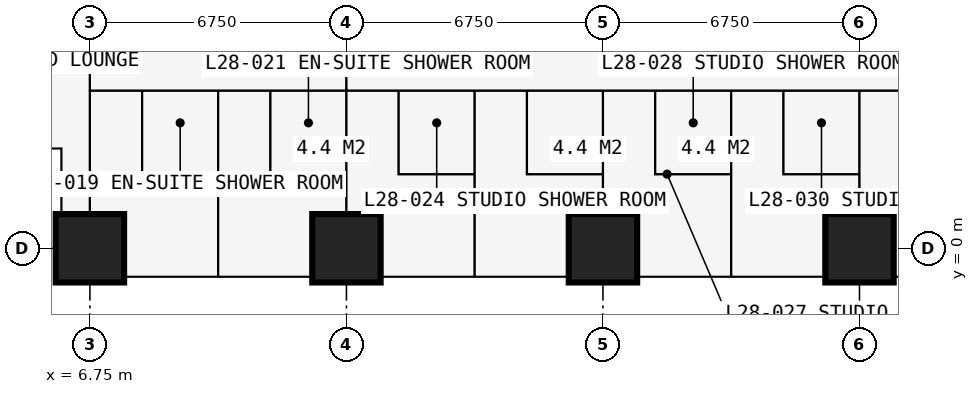
"""IFC4 building model, lengths in metres.
Left out: names, types, materials, properties, quantities, classifications, styles, units other than length and angle.
Written with IfcOpenShell. Run it as: python <this file> out.ifc"""

import sys

from ifc_helpers import new_model, si_unit, direction, frame, frame_2d, origin, origin_2d, place, context, subcontext, project, spatial, rectangle, extrude, element, fill, save


model = new_model("IFC4")
c1 = context("Model", 3, precision=1e-05, world=origin(), true_north=direction((0.0, 1.0)))
c2 = subcontext(c1, "Body", "Model", "MODEL_VIEW")
j1 = project(units=[si_unit("LENGTHUNIT", "METRE"), si_unit("PLANEANGLEUNIT", "RADIAN")], contexts=[c1])
p1 = place(None, origin())
s1 = spatial("IfcSite", under=j1, at=p1, CompositionType="ELEMENT")
p2 = place(p1, origin())
s2 = spatial("IfcBuilding", under=s1, at=p2, CompositionType="ELEMENT")
p3 = place(p2, frame((0.0, 0.0, 105.3)))
s3 = spatial("IfcBuildingStorey", under=s2, at=p3, CompositionType="ELEMENT", Elevation=105.3)
for number, where, z_axis, x_axis in (
    (1, (6.75, 0.0, 0.0), (0.0, 0.0, 1.0), (1.0, 0.0, 0.0)),
    (2, (13.5, 0.0, 0.0), (0.0, 0.0, 1.0), (1.0, 0.0, 0.0)),
    (3, (20.25, 0.0, 0.0), (0.0, 0.0, 1.0), (1.0, 0.0, 0.0)),
    (4, (27.0, 0.0, 0.0), (0.0, 0.0, 1.0), (1.0, 0.0, 0.0)),
):
    element("IfcColumn", number, at=place(p3, frame(where, z_axis=z_axis, x_axis=x_axis)), inside=s3, PredefinedType="COLUMN", context=c2, shape_type="SweptSolid", body=[
        extrude(rectangle(XDim=1.8, YDim=1.8, at=origin_2d()), origin(), (0.0, 0.0, 1.0), 3.6),
    ])
p4 = place(p3, frame((2.625, 2.625, 0.0), z_axis=(0.0, 0.0, 1.0), x_axis=(1.0, 0.0, 0.0)))
e5 = element("IfcWall", 5, at=p4, inside=s3, PredefinedType="SOLIDWALL", context=c2, shape_type="SweptSolid", body=[
    extrude(rectangle(XDim=3.375, YDim=0.3, at=frame_2d((1.688, 0.0))), origin(), (0.0, 0.0, 1.0), 3.375),
])
p5 = place(p4, frame((0.788, 0.0, 0.6)))
e6 = element("IfcOpeningElement", 6, at=p5, cuts=e5, PredefinedType="OPENING", context=c2, shape_type="SweptSolid", body=[
    extrude(rectangle(XDim=1.8, YDim=2.1, at=frame_2d((0.9, 1.05))), frame((0.0, 0.16, 0.0), z_axis=(0.0, -1.0, 0.0), x_axis=(1.0, 0.0, 0.0)), (0.0, 0.0, 1.0), 0.32),
])
p6 = place(p3, frame((6.0, 2.625, 0.0), z_axis=(0.0, 0.0, 1.0), x_axis=(0.0, -1.0, 0.0)))
e7 = element("IfcWall", 7, at=p6, inside=s3, PredefinedType="SOLIDWALL", context=c2, shape_type="SweptSolid", body=[
    extrude(rectangle(XDim=3.375, YDim=0.3, at=frame_2d((1.688, 0.0))), origin(), (0.0, 0.0, 1.0), 3.375),
])
p7 = place(p6, frame((0.343, 0.0, 0.9)))
e8 = element("IfcOpeningElement", 8, at=p7, cuts=e7, PredefinedType="OPENING", context=c2, shape_type="SweptSolid", body=[
    extrude(rectangle(XDim=1.2, YDim=1.8, at=frame_2d((0.6, 0.9))), frame((0.0, 0.16, 0.0), z_axis=(0.0, -1.0, 0.0), x_axis=(1.0, 0.0, 0.0)), (0.0, 0.0, 1.0), 0.32),
])
p8 = place(p3, frame((27.0, -0.75, 0.0), z_axis=(0.0, 0.0, 1.0), x_axis=(-1.0, 0.0, 0.0)))
e9 = element("IfcWall", 9, at=p8, inside=s3, PredefinedType="SOLIDWALL", context=c2, shape_type="SweptSolid", body=[
    extrude(rectangle(XDim=6.75, YDim=0.15, at=frame_2d((3.375, 0.0))), origin(), (0.0, 0.0, 1.0), 3.375),
])
p9 = place(p8, frame((0.962, 0.0, 0.0)))
e10 = element("IfcOpeningElement", 10, at=p9, cuts=e9, PredefinedType="OPENING", context=c2, shape_type="SweptSolid", body=[
    extrude(rectangle(XDim=1.0, YDim=2.2, at=frame_2d((0.5, 1.1))), frame((0.0, 0.085, 0.0), z_axis=(0.0, -1.0, 0.0), x_axis=(1.0, 0.0, 0.0)), (0.0, 0.0, 1.0), 0.17),
])
p10 = place(p8, frame((2.025, 0.0, 0.9)))
e11 = element("IfcOpeningElement", 11, at=p10, cuts=e9, PredefinedType="OPENING", context=c2, shape_type="SweptSolid", body=[
    extrude(rectangle(XDim=1.2, YDim=1.8, at=frame_2d((0.6, 0.9))), frame((0.0, 0.085, 0.0), z_axis=(0.0, -1.0, 0.0), x_axis=(1.0, 0.0, 0.0)), (0.0, 0.0, 1.0), 0.17),
])
p11 = place(p8, frame((4.788, 0.0, 0.0)))
e12 = element("IfcOpeningElement", 12, at=p11, cuts=e9, PredefinedType="OPENING", context=c2, shape_type="SweptSolid", body=[
    extrude(rectangle(XDim=1.0, YDim=2.2, at=frame_2d((0.5, 1.1))), frame((0.0, 0.085, 0.0), z_axis=(0.0, -1.0, 0.0), x_axis=(1.0, 0.0, 0.0)), (0.0, 0.0, 1.0), 0.17),
])
p12 = place(p8, frame((3.525, 0.0, 0.9)))
e13 = element("IfcOpeningElement", 13, at=p12, cuts=e9, PredefinedType="OPENING", context=c2, shape_type="SweptSolid", body=[
    extrude(rectangle(XDim=1.2, YDim=1.8, at=frame_2d((0.6, 0.9))), frame((0.0, 0.085, 0.0), z_axis=(0.0, -1.0, 0.0), x_axis=(1.0, 0.0, 0.0)), (0.0, 0.0, 1.0), 0.17),
])
p13 = place(p3, frame((23.625, -0.85, 0.0), z_axis=(0.0, 0.0, 1.0), x_axis=(0.0, -1.0, 0.0)))
e14 = element("IfcWall", 14, at=p13, inside=s3, PredefinedType="USERDEFINED", context=c2, shape_type="SweptSolid", body=[
    extrude(rectangle(XDim=2.2, YDim=1.0, at=frame_2d((1.1, 0.0))), origin(), (0.0, 0.0, 1.0), 0.9),
])
p14 = place(p3, frame((6.75, -0.734, 0.0), z_axis=(0.0, 0.0, 1.0), x_axis=(0.0, 1.0, 0.0)))
e15 = element("IfcWall", 15, at=p14, inside=s3, PredefinedType="PARTITIONING", context=c2, shape_type="SweptSolid", body=[
    extrude(rectangle(XDim=10.859, YDim=0.15, at=frame_2d((5.429, 0.0))), origin(), (0.0, 0.0, 1.0), 2.877),
])
p15 = place(p3, frame((6.75, 4.15, 0.0), z_axis=(0.0, 0.0, 1.0), x_axis=(1.0, 0.0, 0.0)))
e16 = element("IfcWall", 16, at=p15, inside=s3, PredefinedType="PARTITIONING", context=c2, shape_type="SweptSolid", body=[
    extrude(rectangle(XDim=23.625, YDim=0.1, at=frame_2d((11.812, 0.0))), origin(), (0.0, 0.0, 1.0), 3.375),
])
p16 = place(p15, frame((0.2, 0.0, 0.0)))
e17 = element("IfcOpeningElement", 17, at=p16, cuts=e16, PredefinedType="OPENING", context=c2, shape_type="SweptSolid", body=[
    extrude(rectangle(XDim=0.95, YDim=2.2, at=frame_2d((0.475, 1.1))), frame((0.0, 0.06, 0.0), z_axis=(0.0, -1.0, 0.0), x_axis=(1.0, 0.0, 0.0)), (0.0, 0.0, 1.0), 0.12),
])
p17 = place(p15, frame((3.625, 0.0, 0.0)))
e18 = element("IfcOpeningElement", 18, at=p17, cuts=e16, PredefinedType="OPENING", context=c2, shape_type="SweptSolid", body=[
    extrude(rectangle(XDim=0.95, YDim=2.2, at=frame_2d((0.475, 1.1))), frame((0.0, 0.06, 0.0), z_axis=(0.0, -1.0, 0.0), x_axis=(1.0, 0.0, 0.0)), (0.0, 0.0, 1.0), 0.12),
])
p18 = place(p15, frame((6.95, 0.0, 0.0)))
e19 = element("IfcOpeningElement", 19, at=p18, cuts=e16, PredefinedType="OPENING", context=c2, shape_type="SweptSolid", body=[
    extrude(rectangle(XDim=0.95, YDim=2.2, at=frame_2d((0.475, 1.1))), frame((0.0, 0.06, 0.0), z_axis=(0.0, -1.0, 0.0), x_axis=(1.0, 0.0, 0.0)), (0.0, 0.0, 1.0), 0.12),
])
p19 = place(p15, frame((10.375, 0.0, 0.0)))
e20 = element("IfcOpeningElement", 20, at=p19, cuts=e16, PredefinedType="OPENING", context=c2, shape_type="SweptSolid", body=[
    extrude(rectangle(XDim=0.95, YDim=2.2, at=frame_2d((0.475, 1.1))), frame((0.0, 0.06, 0.0), z_axis=(0.0, -1.0, 0.0), x_axis=(1.0, 0.0, 0.0)), (0.0, 0.0, 1.0), 0.12),
])
p20 = place(p15, frame((13.75, 0.0, 0.0)))
e21 = element("IfcOpeningElement", 21, at=p20, cuts=e16, PredefinedType="OPENING", context=c2, shape_type="SweptSolid", body=[
    extrude(rectangle(XDim=0.95, YDim=2.2, at=frame_2d((0.475, 1.1))), frame((0.0, 0.06, 0.0), z_axis=(0.0, -1.0, 0.0), x_axis=(1.0, 0.0, 0.0)), (0.0, 0.0, 1.0), 0.12),
])
p21 = place(p15, frame((17.125, 0.0, 0.0)))
e22 = element("IfcOpeningElement", 22, at=p21, cuts=e16, PredefinedType="OPENING", context=c2, shape_type="SweptSolid", body=[
    extrude(rectangle(XDim=0.95, YDim=2.2, at=frame_2d((0.475, 1.1))), frame((0.0, 0.06, 0.0), z_axis=(0.0, -1.0, 0.0), x_axis=(1.0, 0.0, 0.0)), (0.0, 0.0, 1.0), 0.12),
])
p22 = place(p15, frame((20.5, 0.0, 0.0)))
e23 = element("IfcOpeningElement", 23, at=p22, cuts=e16, PredefinedType="OPENING", context=c2, shape_type="SweptSolid", body=[
    extrude(rectangle(XDim=0.95, YDim=2.2, at=frame_2d((0.475, 1.1))), frame((0.0, 0.06, 0.0), z_axis=(0.0, -1.0, 0.0), x_axis=(1.0, 0.0, 0.0)), (0.0, 0.0, 1.0), 0.12),
])
p23 = place(p3, frame((8.125, 1.95, 0.0), z_axis=(0.0, 0.0, 1.0), x_axis=(0.0, 1.0, 0.0)))
e24 = element("IfcWall", 24, at=p23, inside=s3, PredefinedType="PARTITIONING", context=c2, shape_type="SweptSolid", body=[
    extrude(rectangle(XDim=2.2, YDim=0.1, at=frame_2d((1.1, 0.0))), origin(), (0.0, 0.0, 1.0), 3.375),
])
p24 = place(p23, frame((0.65, 0.0, 0.0)))
e25 = element("IfcOpeningElement", 25, at=p24, cuts=e24, PredefinedType="OPENING", context=c2, shape_type="SweptSolid", body=[
    extrude(rectangle(XDim=0.9, YDim=2.2, at=frame_2d((0.45, 1.1))), frame((0.0, 0.06, 0.0), z_axis=(0.0, -1.0, 0.0), x_axis=(1.0, 0.0, 0.0)), (0.0, 0.0, 1.0), 0.12),
])
p25 = place(p3, frame((8.125, 1.95, 0.0), z_axis=(0.0, 0.0, 1.0), x_axis=(1.0, 0.0, 0.0)))
e26 = element("IfcWall", 26, at=p25, inside=s3, PredefinedType="PARTITIONING", context=c2, shape_type="SweptSolid", body=[
    extrude(rectangle(XDim=2.0, YDim=0.1, at=frame_2d((1.0, 0.0))), origin(), (0.0, 0.0, 1.0), 3.375),
])
p26 = place(p3, frame((10.125, -0.734, 0.0), z_axis=(0.0, 0.0, 1.0), x_axis=(0.0, 1.0, 0.0)))
e27 = element("IfcWall", 27, at=p26, inside=s3, PredefinedType="PARTITIONING", context=c2, shape_type="SweptSolid", body=[
    extrude(rectangle(XDim=4.884, YDim=0.175, at=frame_2d((2.442, 0.0))), origin(), (0.0, 0.0, 1.0), 3.375),
])
p27 = place(p3, frame((11.5, 1.95, 0.0), z_axis=(0.0, 0.0, 1.0), x_axis=(0.0, 1.0, 0.0)))
e28 = element("IfcWall", 28, at=p27, inside=s3, PredefinedType="PARTITIONING", context=c2, shape_type="SweptSolid", body=[
    extrude(rectangle(XDim=2.2, YDim=0.1, at=frame_2d((1.1, 0.0))), origin(), (0.0, 0.0, 1.0), 3.375),
])
p28 = place(p27, frame((0.65, 0.0, 0.0)))
e29 = element("IfcOpeningElement", 29, at=p28, cuts=e28, PredefinedType="OPENING", context=c2, shape_type="SweptSolid", body=[
    extrude(rectangle(XDim=0.9, YDim=2.2, at=frame_2d((0.45, 1.1))), frame((0.0, 0.06, 0.0), z_axis=(0.0, -1.0, 0.0), x_axis=(1.0, 0.0, 0.0)), (0.0, 0.0, 1.0), 0.12),
])
p29 = place(p3, frame((11.5, 1.95, 0.0), z_axis=(0.0, 0.0, 1.0), x_axis=(1.0, 0.0, 0.0)))
e30 = element("IfcWall", 30, at=p29, inside=s3, PredefinedType="PARTITIONING", context=c2, shape_type="SweptSolid", body=[
    extrude(rectangle(XDim=2.0, YDim=0.1, at=frame_2d((1.0, 0.0))), origin(), (0.0, 0.0, 1.0), 3.375),
])
p30 = place(p3, frame((13.5, -0.734, 0.0), z_axis=(0.0, 0.0, 1.0), x_axis=(0.0, 1.0, 0.0)))
e31 = element("IfcWall", 31, at=p30, inside=s3, PredefinedType="PARTITIONING", context=c2, shape_type="SweptSolid", body=[
    extrude(rectangle(XDim=12.034, YDim=0.15, at=frame_2d((6.017, 0.0))), origin(), (0.0, 0.0, 1.0), 2.61),
])
p31 = place(p3, frame((14.875, 1.95, 0.0), z_axis=(0.0, 0.0, 1.0), x_axis=(0.0, 1.0, 0.0)))
e32 = element("IfcWall", 32, at=p31, inside=s3, PredefinedType="PARTITIONING", context=c2, shape_type="SweptSolid", body=[
    extrude(rectangle(XDim=2.2, YDim=0.1, at=frame_2d((1.1, 0.0))), origin(), (0.0, 0.0, 1.0), 3.375),
])
p32 = place(p31, frame((0.65, 0.0, 0.0)))
e33 = element("IfcOpeningElement", 33, at=p32, cuts=e32, PredefinedType="OPENING", context=c2, shape_type="SweptSolid", body=[
    extrude(rectangle(XDim=0.9, YDim=2.2, at=frame_2d((0.45, 1.1))), frame((0.0, 0.06, 0.0), z_axis=(0.0, -1.0, 0.0), x_axis=(1.0, 0.0, 0.0)), (0.0, 0.0, 1.0), 0.12),
])
p33 = place(p3, frame((14.875, 1.95, 0.0), z_axis=(0.0, 0.0, 1.0), x_axis=(1.0, 0.0, 0.0)))
e34 = element("IfcWall", 34, at=p33, inside=s3, PredefinedType="PARTITIONING", context=c2, shape_type="SweptSolid", body=[
    extrude(rectangle(XDim=2.0, YDim=0.1, at=frame_2d((1.0, 0.0))), origin(), (0.0, 0.0, 1.0), 3.375),
])
p34 = place(p3, frame((16.875, -0.734, 0.0), z_axis=(0.0, 0.0, 1.0), x_axis=(0.0, 1.0, 0.0)))
e35 = element("IfcWall", 35, at=p34, inside=s3, PredefinedType="PARTITIONING", context=c2, shape_type="SweptSolid", body=[
    extrude(rectangle(XDim=4.884, YDim=0.175, at=frame_2d((2.442, 0.0))), origin(), (0.0, 0.0, 1.0), 3.375),
])
p35 = place(p3, frame((18.25, 1.95, 0.0), z_axis=(0.0, 0.0, 1.0), x_axis=(0.0, 1.0, 0.0)))
e36 = element("IfcWall", 36, at=p35, inside=s3, PredefinedType="PARTITIONING", context=c2, shape_type="SweptSolid", body=[
    extrude(rectangle(XDim=2.2, YDim=0.1, at=frame_2d((1.1, 0.0))), origin(), (0.0, 0.0, 1.0), 3.375),
])
p36 = place(p35, frame((0.65, 0.0, 0.0)))
e37 = element("IfcOpeningElement", 37, at=p36, cuts=e36, PredefinedType="OPENING", context=c2, shape_type="SweptSolid", body=[
    extrude(rectangle(XDim=0.9, YDim=2.2, at=frame_2d((0.45, 1.1))), frame((0.0, 0.06, 0.0), z_axis=(0.0, -1.0, 0.0), x_axis=(1.0, 0.0, 0.0)), (0.0, 0.0, 1.0), 0.12),
])
p37 = place(p3, frame((18.25, 1.95, 0.0), z_axis=(0.0, 0.0, 1.0), x_axis=(1.0, 0.0, 0.0)))
e38 = element("IfcWall", 38, at=p37, inside=s3, PredefinedType="PARTITIONING", context=c2, shape_type="SweptSolid", body=[
    extrude(rectangle(XDim=2.0, YDim=0.1, at=frame_2d((1.0, 0.0))), origin(), (0.0, 0.0, 1.0), 3.375),
])
p38 = place(p3, frame((20.25, -0.734, 0.0), z_axis=(0.0, 0.0, 1.0), x_axis=(0.0, 1.0, 0.0)))
e39 = element("IfcWall", 39, at=p38, inside=s3, PredefinedType="PARTITIONING", context=c2, shape_type="SweptSolid", body=[
    extrude(rectangle(XDim=4.884, YDim=0.175, at=frame_2d((2.442, 0.0))), origin(), (0.0, 0.0, 1.0), 2.61),
])
p39 = place(p3, frame((21.625, 1.95, 0.0), z_axis=(0.0, 0.0, 1.0), x_axis=(0.0, 1.0, 0.0)))
e40 = element("IfcWall", 40, at=p39, inside=s3, PredefinedType="PARTITIONING", context=c2, shape_type="SweptSolid", body=[
    extrude(rectangle(XDim=2.2, YDim=0.1, at=frame_2d((1.1, 0.0))), origin(), (0.0, 0.0, 1.0), 3.375),
])
p40 = place(p39, frame((0.65, 0.0, 0.0)))
e41 = element("IfcOpeningElement", 41, at=p40, cuts=e40, PredefinedType="OPENING", context=c2, shape_type="SweptSolid", body=[
    extrude(rectangle(XDim=0.9, YDim=2.2, at=frame_2d((0.45, 1.1))), frame((0.0, 0.06, 0.0), z_axis=(0.0, -1.0, 0.0), x_axis=(1.0, 0.0, 0.0)), (0.0, 0.0, 1.0), 0.12),
])
p41 = place(p3, frame((21.625, 1.95, 0.0), z_axis=(0.0, 0.0, 1.0), x_axis=(1.0, 0.0, 0.0)))
e42 = element("IfcWall", 42, at=p41, inside=s3, PredefinedType="PARTITIONING", context=c2, shape_type="SweptSolid", body=[
    extrude(rectangle(XDim=2.0, YDim=0.1, at=frame_2d((1.0, 0.0))), origin(), (0.0, 0.0, 1.0), 3.375),
])
p42 = place(p3, frame((23.625, -0.734, 0.0), z_axis=(0.0, 0.0, 1.0), x_axis=(0.0, 1.0, 0.0)))
e43 = element("IfcWall", 43, at=p42, inside=s3, PredefinedType="PARTITIONING", context=c2, shape_type="SweptSolid", body=[
    extrude(rectangle(XDim=4.884, YDim=0.175, at=frame_2d((2.442, 0.0))), origin(), (0.0, 0.0, 1.0), 3.375),
])
p43 = place(p3, frame((25.0, 1.95, 0.0), z_axis=(0.0, 0.0, 1.0), x_axis=(0.0, 1.0, 0.0)))
e44 = element("IfcWall", 44, at=p43, inside=s3, PredefinedType="PARTITIONING", context=c2, shape_type="SweptSolid", body=[
    extrude(rectangle(XDim=2.2, YDim=0.1, at=frame_2d((1.1, 0.0))), origin(), (0.0, 0.0, 1.0), 3.375),
])
p44 = place(p43, frame((0.65, 0.0, 0.0)))
e45 = element("IfcOpeningElement", 45, at=p44, cuts=e44, PredefinedType="OPENING", context=c2, shape_type="SweptSolid", body=[
    extrude(rectangle(XDim=0.9, YDim=2.2, at=frame_2d((0.45, 1.1))), frame((0.0, 0.06, 0.0), z_axis=(0.0, -1.0, 0.0), x_axis=(1.0, 0.0, 0.0)), (0.0, 0.0, 1.0), 0.12),
])
p45 = place(p3, frame((25.0, 1.95, 0.0), z_axis=(0.0, 0.0, 1.0), x_axis=(1.0, 0.0, 0.0)))
e46 = element("IfcWall", 46, at=p45, inside=s3, PredefinedType="PARTITIONING", context=c2, shape_type="SweptSolid", body=[
    extrude(rectangle(XDim=2.0, YDim=0.1, at=frame_2d((1.0, 0.0))), origin(), (0.0, 0.0, 1.0), 3.375),
])
p46 = place(p3, frame((27.0, -0.734, 0.0), z_axis=(0.0, 0.0, 1.0), x_axis=(0.0, 1.0, 0.0)))
e47 = element("IfcWall", 47, at=p46, inside=s3, PredefinedType="PARTITIONING", context=c2, shape_type="SweptSolid", body=[
    extrude(rectangle(XDim=4.884, YDim=0.175, at=frame_2d((2.442, 0.0))), origin(), (0.0, 0.0, 1.0), 2.61),
])
p47 = place(p7, origin())
e48 = element("IfcWindow", 48, at=p47, inside=s3, PartitioningType="SINGLE_PANEL", PredefinedType="WINDOW", context=c2, shape_type="SweptSolid", body=[
    extrude(rectangle(XDim=1.2, YDim=1.8, at=frame_2d((0.6, 0.9))), frame((0.0, 0.03, 0.0), z_axis=(0.0, -1.0, 0.0), x_axis=(1.0, 0.0, 0.0)), (0.0, 0.0, 1.0), 0.06),
])
fill(e8, e48)
p48 = place(p9, origin())
e49 = element("IfcDoor", 49, at=p48, inside=s3, OperationType="SINGLE_SWING_LEFT", PredefinedType="DOOR", context=c2, shape_type="SweptSolid", body=[
    extrude(rectangle(XDim=1.0, YDim=2.2, at=frame_2d((0.5, 1.1))), frame((0.0, 0.025, 0.0), z_axis=(0.0, -1.0, 0.0), x_axis=(1.0, 0.0, 0.0)), (0.0, 0.0, 1.0), 0.05),
])
fill(e10, e49)
p49 = place(p10, origin())
e50 = element("IfcWindow", 50, at=p49, inside=s3, PartitioningType="SINGLE_PANEL", PredefinedType="WINDOW", context=c2, shape_type="SweptSolid", body=[
    extrude(rectangle(XDim=1.2, YDim=1.8, at=frame_2d((0.6, 0.9))), frame((0.0, 0.03, 0.0), z_axis=(0.0, -1.0, 0.0), x_axis=(1.0, 0.0, 0.0)), (0.0, 0.0, 1.0), 0.06),
])
fill(e11, e50)
p50 = place(p11, origin())
e51 = element("IfcDoor", 51, at=p50, inside=s3, OperationType="SINGLE_SWING_RIGHT", PredefinedType="DOOR", context=c2, shape_type="SweptSolid", body=[
    extrude(rectangle(XDim=1.0, YDim=2.2, at=frame_2d((0.5, 1.1))), frame((0.0, 0.025, 0.0), z_axis=(0.0, -1.0, 0.0), x_axis=(1.0, 0.0, 0.0)), (0.0, 0.0, 1.0), 0.05),
])
fill(e12, e51)
p51 = place(p12, origin())
e52 = element("IfcWindow", 52, at=p51, inside=s3, PartitioningType="SINGLE_PANEL", PredefinedType="WINDOW", context=c2, shape_type="SweptSolid", body=[
    extrude(rectangle(XDim=1.2, YDim=1.8, at=frame_2d((0.6, 0.9))), frame((0.0, 0.03, 0.0), z_axis=(0.0, -1.0, 0.0), x_axis=(1.0, 0.0, 0.0)), (0.0, 0.0, 1.0), 0.06),
])
fill(e13, e52)
p52 = place(p16, origin())
e53 = element("IfcDoor", 53, at=p52, inside=s3, OperationType="SINGLE_SWING_LEFT", PredefinedType="DOOR", context=c2, shape_type="SweptSolid", body=[
    extrude(rectangle(XDim=0.95, YDim=2.2, at=frame_2d((0.475, 1.1))), frame((0.0, 0.025, 0.0), z_axis=(0.0, -1.0, 0.0), x_axis=(1.0, 0.0, 0.0)), (0.0, 0.0, 1.0), 0.05),
])
fill(e17, e53)
p53 = place(p24, origin())
e54 = element("IfcDoor", 54, at=p53, inside=s3, OperationType="SINGLE_SWING_RIGHT", PredefinedType="DOOR", context=c2, shape_type="SweptSolid", body=[
    extrude(rectangle(XDim=0.9, YDim=2.2, at=frame_2d((0.45, 1.1))), frame((0.0, 0.025, 0.0), z_axis=(0.0, -1.0, 0.0), x_axis=(1.0, 0.0, 0.0)), (0.0, 0.0, 1.0), 0.05),
])
fill(e25, e54)
p54 = place(p17, origin())
e55 = element("IfcDoor", 55, at=p54, inside=s3, OperationType="SINGLE_SWING_LEFT", PredefinedType="DOOR", context=c2, shape_type="SweptSolid", body=[
    extrude(rectangle(XDim=0.95, YDim=2.2, at=frame_2d((0.475, 1.1))), frame((0.0, 0.025, 0.0), z_axis=(0.0, -1.0, 0.0), x_axis=(1.0, 0.0, 0.0)), (0.0, 0.0, 1.0), 0.05),
])
fill(e18, e55)
p55 = place(p28, origin())
e56 = element("IfcDoor", 56, at=p55, inside=s3, OperationType="SINGLE_SWING_RIGHT", PredefinedType="DOOR", context=c2, shape_type="SweptSolid", body=[
    extrude(rectangle(XDim=0.9, YDim=2.2, at=frame_2d((0.45, 1.1))), frame((0.0, 0.025, 0.0), z_axis=(0.0, -1.0, 0.0), x_axis=(1.0, 0.0, 0.0)), (0.0, 0.0, 1.0), 0.05),
])
fill(e29, e56)
p56 = place(p18, origin())
e57 = element("IfcDoor", 57, at=p56, inside=s3, OperationType="SINGLE_SWING_LEFT", PredefinedType="DOOR", context=c2, shape_type="SweptSolid", body=[
    extrude(rectangle(XDim=0.95, YDim=2.2, at=frame_2d((0.475, 1.1))), frame((0.0, 0.025, 0.0), z_axis=(0.0, -1.0, 0.0), x_axis=(1.0, 0.0, 0.0)), (0.0, 0.0, 1.0), 0.05),
])
fill(e19, e57)
p57 = place(p32, origin())
e58 = element("IfcDoor", 58, at=p57, inside=s3, OperationType="SINGLE_SWING_RIGHT", PredefinedType="DOOR", context=c2, shape_type="SweptSolid", body=[
    extrude(rectangle(XDim=0.9, YDim=2.2, at=frame_2d((0.45, 1.1))), frame((0.0, 0.025, 0.0), z_axis=(0.0, -1.0, 0.0), x_axis=(1.0, 0.0, 0.0)), (0.0, 0.0, 1.0), 0.05),
])
fill(e33, e58)
p58 = place(p19, origin())
e59 = element("IfcDoor", 59, at=p58, inside=s3, OperationType="SINGLE_SWING_LEFT", PredefinedType="DOOR", context=c2, shape_type="SweptSolid", body=[
    extrude(rectangle(XDim=0.95, YDim=2.2, at=frame_2d((0.475, 1.1))), frame((0.0, 0.025, 0.0), z_axis=(0.0, -1.0, 0.0), x_axis=(1.0, 0.0, 0.0)), (0.0, 0.0, 1.0), 0.05),
])
fill(e20, e59)
p59 = place(p36, origin())
e60 = element("IfcDoor", 60, at=p59, inside=s3, OperationType="SINGLE_SWING_RIGHT", PredefinedType="DOOR", context=c2, shape_type="SweptSolid", body=[
    extrude(rectangle(XDim=0.9, YDim=2.2, at=frame_2d((0.45, 1.1))), frame((0.0, 0.025, 0.0), z_axis=(0.0, -1.0, 0.0), x_axis=(1.0, 0.0, 0.0)), (0.0, 0.0, 1.0), 0.05),
])
fill(e37, e60)
p60 = place(p20, origin())
e61 = element("IfcDoor", 61, at=p60, inside=s3, OperationType="SINGLE_SWING_LEFT", PredefinedType="DOOR", context=c2, shape_type="SweptSolid", body=[
    extrude(rectangle(XDim=0.95, YDim=2.2, at=frame_2d((0.475, 1.1))), frame((0.0, 0.025, 0.0), z_axis=(0.0, -1.0, 0.0), x_axis=(1.0, 0.0, 0.0)), (0.0, 0.0, 1.0), 0.05),
])
fill(e21, e61)
p61 = place(p40, origin())
e62 = element("IfcDoor", 62, at=p61, inside=s3, OperationType="SINGLE_SWING_RIGHT", PredefinedType="DOOR", context=c2, shape_type="SweptSolid", body=[
    extrude(rectangle(XDim=0.9, YDim=2.2, at=frame_2d((0.45, 1.1))), frame((0.0, 0.025, 0.0), z_axis=(0.0, -1.0, 0.0), x_axis=(1.0, 0.0, 0.0)), (0.0, 0.0, 1.0), 0.05),
])
fill(e41, e62)
p62 = place(p21, origin())
e63 = element("IfcDoor", 63, at=p62, inside=s3, OperationType="SINGLE_SWING_LEFT", PredefinedType="DOOR", context=c2, shape_type="SweptSolid", body=[
    extrude(rectangle(XDim=0.95, YDim=2.2, at=frame_2d((0.475, 1.1))), frame((0.0, 0.025, 0.0), z_axis=(0.0, -1.0, 0.0), x_axis=(1.0, 0.0, 0.0)), (0.0, 0.0, 1.0), 0.05),
])
fill(e22, e63)
p63 = place(p44, origin())
e64 = element("IfcDoor", 64, at=p63, inside=s3, OperationType="SINGLE_SWING_RIGHT", PredefinedType="DOOR", context=c2, shape_type="SweptSolid", body=[
    extrude(rectangle(XDim=0.9, YDim=2.2, at=frame_2d((0.45, 1.1))), frame((0.0, 0.025, 0.0), z_axis=(0.0, -1.0, 0.0), x_axis=(1.0, 0.0, 0.0)), (0.0, 0.0, 1.0), 0.05),
])
fill(e45, e64)
p64 = place(p22, origin())
e65 = element("IfcDoor", 65, at=p64, inside=s3, OperationType="SINGLE_SWING_LEFT", PredefinedType="DOOR", context=c2, shape_type="SweptSolid", body=[
    extrude(rectangle(XDim=0.95, YDim=2.2, at=frame_2d((0.475, 1.1))), frame((0.0, 0.025, 0.0), z_axis=(0.0, -1.0, 0.0), x_axis=(1.0, 0.0, 0.0)), (0.0, 0.0, 1.0), 0.05),
])
fill(e23, e65)
save(model, sys.argv[1])
